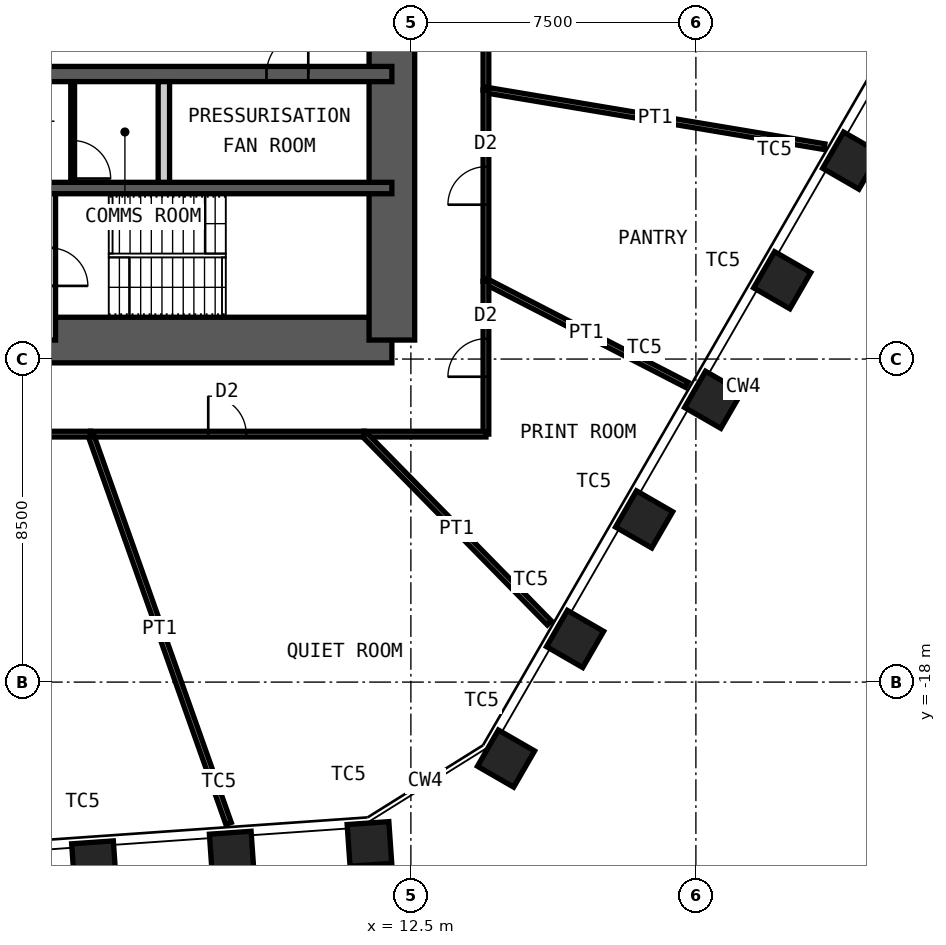
"""IFC4 building model, lengths in metres.
Left out: names, types, materials, properties, quantities, classifications, styles, units other than length and angle.
Written with IfcOpenShell. Run it as: python <this file> out.ifc"""

import sys

from ifc_helpers import new_model, si_unit, direction, frame, frame_2d, origin, origin_2d, place, context, subcontext, project, spatial, rectangle, hollow_rectangle, extrude, element, fill, save


model = new_model("IFC4")
c1 = context("Model", 3, precision=1e-05, world=origin(), true_north=direction((0.0, 1.0)))
c2 = subcontext(c1, "Body", "Model", "MODEL_VIEW")
j1 = project(units=[si_unit("LENGTHUNIT", "METRE"), si_unit("PLANEANGLEUNIT", "RADIAN")], contexts=[c1])
p1 = place(None, origin())
s1 = spatial("IfcSite", under=j1, at=p1, CompositionType="ELEMENT")
p2 = place(p1, origin())
s2 = spatial("IfcBuilding", under=s1, at=p2, CompositionType="ELEMENT")
p3 = place(p2, frame((0.0, 0.0, 188.8)))
s3 = spatial("IfcBuildingStorey", under=s2, at=p3, CompositionType="ELEMENT", Elevation=188.8)
for number, where, z_axis, x_axis in (
    (1, (24.088, -4.279, 0.0), (0.0, 0.0, 1.0), (0.5, 0.866, 0.0)),
    (2, (22.271, -7.426, 0.0), (0.0, 0.0, 1.0), (0.5, 0.866, 0.0)),
    (3, (20.454, -10.572, 0.0), (0.0, 0.0, 1.0), (0.5, 0.866, 0.0)),
    (4, (18.637, -13.719, 0.0), (0.0, 0.0, 1.0), (0.5, 0.866, 0.0)),
    (5, (16.821, -16.866, 0.0), (0.0, 0.0, 1.0), (0.5, 0.866, 0.0)),
    (6, (15.004, -20.012, 0.0), (0.0, 0.0, 1.0), (0.5, 0.866, 0.0)),
    (7, (11.41, -22.258, 0.0), (0.0, 0.0, 1.0), (0.998, 0.07, 0.0)),
    (8, (7.785, -22.512, 0.0), (0.0, 0.0, 1.0), (0.998, 0.07, 0.0)),
    (9, (4.16, -22.765, 0.0), (0.0, 0.0, 1.0), (0.998, 0.07, 0.0)),
):
    element("IfcColumn", number, at=place(p3, frame(where, z_axis=z_axis, x_axis=x_axis)), inside=s3, PredefinedType="COLUMN", context=c2, shape_type="SweptSolid", body=[
        extrude(hollow_rectangle(XDim=1.1, YDim=1.1, WallThickness=0.07, at=origin_2d()), origin(), (0.0, 0.0, 1.0), 4.2),
    ])
p4 = place(p3, frame((-12.0, -9.0, 0.0), z_axis=(0.0, 0.0, 1.0), x_axis=(1.0, 0.0, 0.0)))
e10 = element("IfcWall", 10, at=p4, inside=s3, PredefinedType="SHEAR", context=c2, shape_type="SweptSolid", body=[
    extrude(rectangle(XDim=24.0, YDim=1.2, at=frame_2d((12.0, 0.0))), origin(), (0.0, 0.0, 1.0), 4.2),
])
p5 = place(p4, frame((1.35, 0.0, 0.0)))
e11 = element("IfcOpeningElement", 11, at=p5, cuts=e10, PredefinedType="OPENING", context=c2, shape_type="SweptSolid", body=[
    extrude(rectangle(XDim=1.0, YDim=2.1, at=frame_2d((0.5, 1.05))), frame((0.0, 0.61, 0.0), z_axis=(0.0, -1.0, 0.0), x_axis=(1.0, 0.0, 0.0)), (0.0, 0.0, 1.0), 1.22),
])
p6 = place(p4, frame((5.325, 0.0, 0.0)))
e12 = element("IfcOpeningElement", 12, at=p6, cuts=e10, PredefinedType="OPENING", context=c2, shape_type="SweptSolid", body=[
    extrude(rectangle(XDim=1.15, YDim=2.1, at=frame_2d((0.575, 1.05))), frame((0.0, 0.61, 0.0), z_axis=(0.0, -1.0, 0.0), x_axis=(1.0, 0.0, 0.0)), (0.0, 0.0, 1.0), 1.22),
])
p7 = place(p4, frame((12.6, 0.0, 0.0)))
e13 = element("IfcOpeningElement", 13, at=p7, cuts=e10, PredefinedType="OPENING", context=c2, shape_type="SweptSolid", body=[
    extrude(rectangle(XDim=1.0, YDim=2.1, at=frame_2d((0.5, 1.05))), frame((0.0, 0.61, 0.0), z_axis=(0.0, -1.0, 0.0), x_axis=(1.0, 0.0, 0.0)), (0.0, 0.0, 1.0), 1.22),
])
p8 = place(p3, frame((12.0, -9.0, 0.0), z_axis=(0.0, 0.0, 1.0), x_axis=(0.0, 1.0, 0.0)))
e14 = element("IfcWall", 14, at=p8, inside=s3, PredefinedType="SHEAR", context=c2, shape_type="SweptSolid", body=[
    extrude(rectangle(XDim=18.0, YDim=1.2, at=frame_2d((9.0, 0.0))), origin(), (0.0, 0.0, 1.0), 4.2),
])
p9 = place(p8, frame((8.1, 0.0, 0.0)))
e15 = element("IfcOpeningElement", 15, at=p9, cuts=e14, PredefinedType="OPENING", context=c2, shape_type="SweptSolid", body=[
    extrude(rectangle(XDim=1.8, YDim=2.1, at=frame_2d((0.9, 1.05))), frame((0.0, 0.61, 0.0), z_axis=(0.0, -1.0, 0.0), x_axis=(1.0, 0.0, 0.0)), (0.0, 0.0, 1.0), 1.22),
])
p10 = place(p3, frame((-12.0, -2.0, 0.0), z_axis=(0.0, 0.0, 1.0), x_axis=(1.0, 0.0, 0.0)))
e16 = element("IfcWall", 16, at=p10, inside=s3, PredefinedType="SHEAR", context=c2, shape_type="SweptSolid", body=[
    extrude(rectangle(XDim=24.0, YDim=0.4, at=frame_2d((12.0, 0.0))), origin(), (0.0, 0.0, 1.0), 4.2),
])
p11 = place(p10, frame((1.1, 0.0, 0.0)))
e17 = element("IfcOpeningElement", 17, at=p11, cuts=e16, PredefinedType="OPENING", context=c2, shape_type="SweptSolid", body=[
    extrude(rectangle(XDim=1.1, YDim=2.1, at=frame_2d((0.55, 1.05))), frame((0.0, 0.21, 0.0), z_axis=(0.0, -1.0, 0.0), x_axis=(1.0, 0.0, 0.0)), (0.0, 0.0, 1.0), 0.42),
])
p12 = place(p10, frame((13.55, 0.0, 0.0)))
e18 = element("IfcOpeningElement", 18, at=p12, cuts=e16, PredefinedType="OPENING", context=c2, shape_type="SweptSolid", body=[
    extrude(rectangle(XDim=1.1, YDim=2.1, at=frame_2d((0.55, 1.05))), frame((0.0, 0.21, 0.0), z_axis=(0.0, -1.0, 0.0), x_axis=(1.0, 0.0, 0.0)), (0.0, 0.0, 1.0), 0.42),
])
p13 = place(p10, frame((20.7, 0.0, 0.0)))
e19 = element("IfcOpeningElement", 19, at=p13, cuts=e16, PredefinedType="OPENING", context=c2, shape_type="SweptSolid", body=[
    extrude(rectangle(XDim=1.1, YDim=2.1, at=frame_2d((0.55, 1.05))), frame((0.0, 0.21, 0.0), z_axis=(0.0, -1.0, 0.0), x_axis=(1.0, 0.0, 0.0)), (0.0, 0.0, 1.0), 0.42),
])
p14 = place(p10, frame((4.0, 0.0, 0.0)))
e20 = element("IfcOpeningElement", 20, at=p14, cuts=e16, PredefinedType="OPENING", context=c2, shape_type="SweptSolid", body=[
    extrude(rectangle(XDim=1.0, YDim=2.1, at=frame_2d((0.5, 1.05))), frame((0.0, 0.21, 0.0), z_axis=(0.0, -1.0, 0.0), x_axis=(1.0, 0.0, 0.0)), (0.0, 0.0, 1.0), 0.42),
])
p15 = place(p10, frame((6.8, 0.0, 0.0)))
e21 = element("IfcOpeningElement", 21, at=p15, cuts=e16, PredefinedType="OPENING", context=c2, shape_type="SweptSolid", body=[
    extrude(rectangle(XDim=1.0, YDim=2.1, at=frame_2d((0.5, 1.05))), frame((0.0, 0.21, 0.0), z_axis=(0.0, -1.0, 0.0), x_axis=(1.0, 0.0, 0.0)), (0.0, 0.0, 1.0), 0.42),
])
p16 = place(p3, frame((-12.0, -5.0, 0.0), z_axis=(0.0, 0.0, 1.0), x_axis=(1.0, 0.0, 0.0)))
e22 = element("IfcWall", 22, at=p16, inside=s3, PredefinedType="SHEAR", context=c2, shape_type="SweptSolid", body=[
    extrude(rectangle(XDim=24.0, YDim=0.3, at=frame_2d((12.0, 0.0))), origin(), (0.0, 0.0, 1.0), 4.2),
])
p17 = place(p3, frame((6.0, -4.85, 0.0), z_axis=(0.0, 0.0, 1.0), x_axis=(0.0, 1.0, 0.0)))
e23 = element("IfcWall", 23, at=p17, inside=s3, PredefinedType="PARTITIONING", context=c2, shape_type="SweptSolid", body=[
    extrude(rectangle(XDim=2.65, YDim=0.3, at=frame_2d((1.325, 0.0))), origin(), (0.0, 0.0, 1.0), 3.98),
])
p18 = place(p3, frame((3.0, -9.0, 0.0), z_axis=(0.0, 0.0, 1.0), x_axis=(0.0, 1.0, 0.0)))
e24 = element("IfcWall", 24, at=p18, inside=s3, PredefinedType="PARTITIONING", context=c2, shape_type="SweptSolid", body=[
    extrude(rectangle(XDim=3.85, YDim=0.3, at=frame_2d((1.925, 0.0))), origin(), (0.0, 0.0, 1.0), 3.98),
])
p19 = place(p18, frame((1.425, 0.0, 0.0)))
e25 = element("IfcOpeningElement", 25, at=p19, cuts=e24, PredefinedType="OPENING", context=c2, shape_type="SweptSolid", body=[
    extrude(rectangle(XDim=1.0, YDim=2.1, at=frame_2d((0.5, 1.05))), frame((0.0, 0.16, 0.0), z_axis=(0.0, -1.0, 0.0), x_axis=(1.0, 0.0, 0.0)), (0.0, 0.0, 1.0), 0.32),
])
p20 = place(p3, frame((3.6, -4.85, 0.0), z_axis=(0.0, 0.0, 1.0), x_axis=(0.0, 1.0, 0.0)))
e26 = element("IfcWall", 26, at=p20, inside=s3, PredefinedType="PARTITIONING", context=c2, shape_type="SweptSolid", body=[
    extrude(rectangle(XDim=2.65, YDim=0.1, at=frame_2d((1.325, 0.0))), origin(), (0.0, 0.0, 1.0), 3.98),
])
p21 = place(p20, frame((0.1, 0.0, 0.0)))
e27 = element("IfcOpeningElement", 27, at=p21, cuts=e26, PredefinedType="OPENING", context=c2, shape_type="SweptSolid", body=[
    extrude(rectangle(XDim=1.0, YDim=2.4, at=frame_2d((0.5, 1.2))), frame((0.0, 0.06, 0.0), z_axis=(0.0, -1.0, 0.0), x_axis=(1.0, 0.0, 0.0)), (0.0, 0.0, 1.0), 0.12),
])
p22 = place(p3, frame((14.475, 5.874, 0.0), z_axis=(0.0, 0.0, 1.0), x_axis=(0.0, -1.0, 0.0)))
e28 = element("IfcWall", 28, at=p22, inside=s3, PredefinedType="PARTITIONING", context=c2, shape_type="SweptSolid", body=[
    extrude(rectangle(XDim=8.296, YDim=0.15, at=frame_2d((4.148, 0.0))), origin(), (0.0, 0.0, 1.0), 4.03),
])
p23 = place(p22, frame((3.248, 0.0, 0.0)))
e29 = element("IfcOpeningElement", 29, at=p23, cuts=e28, PredefinedType="OPENING", context=c2, shape_type="SweptSolid", body=[
    extrude(rectangle(XDim=1.8, YDim=2.4, at=frame_2d((0.9, 1.2))), frame((0.0, 0.085, 0.0), z_axis=(0.0, -1.0, 0.0), x_axis=(1.0, 0.0, 0.0)), (0.0, 0.0, 1.0), 0.17),
])
p24 = place(p3, frame((23.383, -3.912, 0.0), z_axis=(0.0, 0.0, 1.0), x_axis=(-0.986293651891, 0.164999491631, 0.0)))
e30 = element("IfcWall", 30, at=p24, inside=s3, PredefinedType="PARTITIONING", context=c2, shape_type="SweptSolid", body=[
    extrude(rectangle(XDim=9.032, YDim=0.15, at=frame_2d((4.516, 0.0))), origin(), (0.0, 0.0, 1.0), 3.43),
])
p25 = place(p3, frame((14.475, -2.422, 0.0), z_axis=(0.0, 0.0, 1.0), x_axis=(0.0, -1.0, 0.0)))
e31 = element("IfcWall", 31, at=p25, inside=s3, PredefinedType="PARTITIONING", context=c2, shape_type="SweptSolid", body=[
    extrude(rectangle(XDim=5.033, YDim=0.15, at=frame_2d((2.517, 0.0))), origin(), (0.0, 0.0, 1.0), 4.03),
])
p26 = place(p25, frame((2.017, 0.0, 0.0)))
e32 = element("IfcOpeningElement", 32, at=p26, cuts=e31, PredefinedType="OPENING", context=c2, shape_type="SweptSolid", body=[
    extrude(rectangle(XDim=1.0, YDim=2.4, at=frame_2d((0.5, 1.2))), frame((0.0, 0.085, 0.0), z_axis=(0.0, -1.0, 0.0), x_axis=(1.0, 0.0, 0.0)), (0.0, 0.0, 1.0), 0.17),
])
p27 = place(p3, frame((19.759, -10.177, 0.0), z_axis=(0.0, 0.0, 1.0), x_axis=(-0.889015092721, 0.457877893017, 0.0)))
e33 = element("IfcWall", 33, at=p27, inside=s3, PredefinedType="PARTITIONING", context=c2, shape_type="SweptSolid", body=[
    extrude(rectangle(XDim=5.944, YDim=0.15, at=frame_2d((2.972, 0.0))), origin(), (0.0, 0.0, 1.0), 3.43),
])
p28 = place(p3, frame((14.475, -7.455, 0.0), z_axis=(0.0, 0.0, 1.0), x_axis=(0.0, -1.0, 0.0)))
e34 = element("IfcWall", 34, at=p28, inside=s3, PredefinedType="PARTITIONING", context=c2, shape_type="SweptSolid", body=[
    extrude(rectangle(XDim=4.02, YDim=0.15, at=frame_2d((2.01, 0.0))), origin(), (0.0, 0.0, 1.0), 4.03),
])
p29 = place(p28, frame((1.51, 0.0, 0.0)))
e35 = element("IfcOpeningElement", 35, at=p29, cuts=e34, PredefinedType="OPENING", context=c2, shape_type="SweptSolid", body=[
    extrude(rectangle(XDim=1.0, YDim=2.4, at=frame_2d((0.5, 1.2))), frame((0.0, 0.085, 0.0), z_axis=(0.0, -1.0, 0.0), x_axis=(1.0, 0.0, 0.0)), (0.0, 0.0, 1.0), 0.17),
])
p30 = place(p3, frame((14.475, -11.475, 0.0), z_axis=(0.0, 0.0, 1.0), x_axis=(-1.0, 0.0, 0.0)))
e36 = element("IfcWall", 36, at=p30, inside=s3, PredefinedType="PARTITIONING", context=c2, shape_type="SweptSolid", body=[
    extrude(rectangle(XDim=3.209, YDim=0.15, at=frame_2d((1.605, 0.0))), origin(), (0.0, 0.0, 1.0), 4.03),
])
p31 = place(p3, frame((16.145, -16.444, 0.0), z_axis=(0.0, 0.0, 1.0), x_axis=(-0.700591378209, 0.71356269576, 0.0)))
e37 = element("IfcWall", 37, at=p31, inside=s3, PredefinedType="PARTITIONING", context=c2, shape_type="SweptSolid", body=[
    extrude(rectangle(XDim=6.964, YDim=0.15, at=frame_2d((3.482, 0.0))), origin(), (0.0, 0.0, 1.0), 3.43),
])
p32 = place(p3, frame((11.266, -11.475, 0.0), z_axis=(0.0, 0.0, 1.0), x_axis=(-1.0, 0.0, 0.0)))
e38 = element("IfcWall", 38, at=p32, inside=s3, PredefinedType="PARTITIONING", context=c2, shape_type="SweptSolid", body=[
    extrude(rectangle(XDim=7.196, YDim=0.15, at=frame_2d((3.598, 0.0))), origin(), (0.0, 0.0, 1.0), 4.03),
])
p33 = place(p32, frame((3.098, 0.0, 0.0)))
e39 = element("IfcOpeningElement", 39, at=p33, cuts=e38, PredefinedType="OPENING", context=c2, shape_type="SweptSolid", body=[
    extrude(rectangle(XDim=1.0, YDim=2.4, at=frame_2d((0.5, 1.2))), frame((0.0, 0.085, 0.0), z_axis=(0.0, -1.0, 0.0), x_axis=(1.0, 0.0, 0.0)), (0.0, 0.0, 1.0), 0.17),
])
p34 = place(p3, frame((7.703, -21.719, 0.0), z_axis=(0.0, 0.0, 1.0), x_axis=(-0.334269551553, 0.942477515331, 0.0)))
e40 = element("IfcWall", 40, at=p34, inside=s3, PredefinedType="PARTITIONING", context=c2, shape_type="SweptSolid", body=[
    extrude(rectangle(XDim=10.869, YDim=0.15, at=frame_2d((5.435, 0.0))), origin(), (0.0, 0.0, 1.0), 3.43),
])
p35 = place(p3, frame((4.07, -11.475, 0.0), z_axis=(0.0, 0.0, 1.0), x_axis=(-1.0, 0.0, 0.0)))
e41 = element("IfcWall", 41, at=p35, inside=s3, PredefinedType="PARTITIONING", context=c2, shape_type="SweptSolid", body=[
    extrude(rectangle(XDim=13.528, YDim=0.15, at=frame_2d((6.764, 0.0))), origin(), (0.0, 0.0, 1.0), 4.03),
])
p36 = place(p35, frame((5.864, 0.0, 0.0)))
e42 = element("IfcOpeningElement", 42, at=p36, cuts=e41, PredefinedType="OPENING", context=c2, shape_type="SweptSolid", body=[
    extrude(rectangle(XDim=1.8, YDim=2.4, at=frame_2d((0.9, 1.2))), frame((0.0, 0.085, 0.0), z_axis=(0.0, -1.0, 0.0), x_axis=(1.0, 0.0, 0.0)), (0.0, 0.0, 1.0), 0.17),
])
p37 = place(p13, origin())
e43 = element("IfcDoor", 43, at=p37, inside=s3, OperationType="SINGLE_SWING_LEFT", PredefinedType="DOOR", context=c2, shape_type="SweptSolid", body=[
    extrude(rectangle(XDim=1.1, YDim=2.1, at=frame_2d((0.55, 1.05))), frame((0.0, 0.025, 0.0), z_axis=(0.0, -1.0, 0.0), x_axis=(1.0, 0.0, 0.0)), (0.0, 0.0, 1.0), 0.05),
])
fill(e19, e43)
p38 = place(p21, origin())
e44 = element("IfcDoor", 44, at=p38, inside=s3, OperationType="SINGLE_SWING_LEFT", PredefinedType="DOOR", context=c2, shape_type="SweptSolid", body=[
    extrude(rectangle(XDim=1.0, YDim=2.4, at=frame_2d((0.5, 1.2))), frame((0.0, 0.025, 0.0), z_axis=(0.0, -1.0, 0.0), x_axis=(1.0, 0.0, 0.0)), (0.0, 0.0, 1.0), 0.05),
])
fill(e27, e44)
p39 = place(p26, origin())
e45 = element("IfcDoor", 45, at=p39, inside=s3, OperationType="SINGLE_SWING_RIGHT", PredefinedType="DOOR", context=c2, shape_type="SweptSolid", body=[
    extrude(rectangle(XDim=1.0, YDim=2.4, at=frame_2d((0.5, 1.2))), frame((0.0, 0.025, 0.0), z_axis=(0.0, -1.0, 0.0), x_axis=(1.0, 0.0, 0.0)), (0.0, 0.0, 1.0), 0.05),
])
fill(e32, e45)
p40 = place(p29, origin())
e46 = element("IfcDoor", 46, at=p40, inside=s3, OperationType="SINGLE_SWING_RIGHT", PredefinedType="DOOR", context=c2, shape_type="SweptSolid", body=[
    extrude(rectangle(XDim=1.0, YDim=2.4, at=frame_2d((0.5, 1.2))), frame((0.0, 0.025, 0.0), z_axis=(0.0, -1.0, 0.0), x_axis=(1.0, 0.0, 0.0)), (0.0, 0.0, 1.0), 0.05),
])
fill(e35, e46)
p41 = place(p33, origin())
e47 = element("IfcDoor", 47, at=p41, inside=s3, OperationType="SINGLE_SWING_RIGHT", PredefinedType="DOOR", context=c2, shape_type="SweptSolid", body=[
    extrude(rectangle(XDim=1.0, YDim=2.4, at=frame_2d((0.5, 1.2))), frame((0.0, 0.025, 0.0), z_axis=(0.0, -1.0, 0.0), x_axis=(1.0, 0.0, 0.0)), (0.0, 0.0, 1.0), 0.05),
])
fill(e39, e47)
save(model, sys.argv[1])
